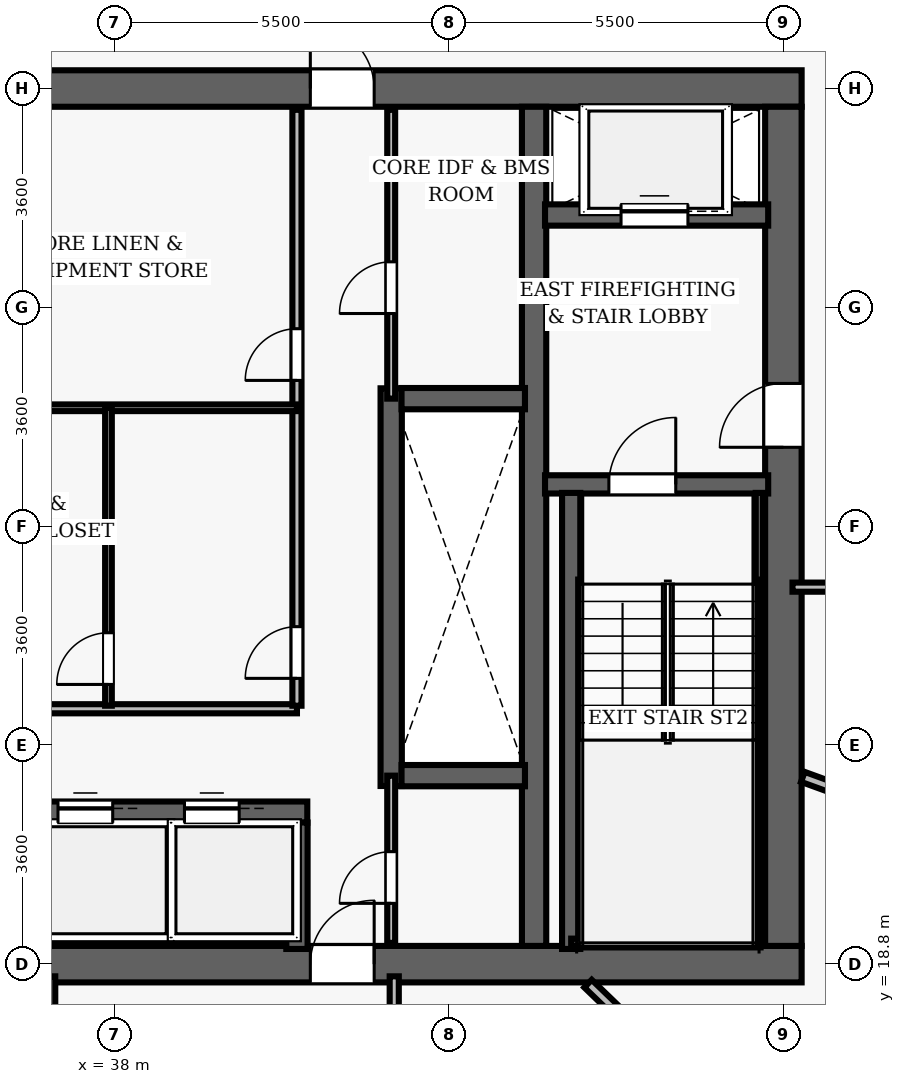
"""IFC4 building model, lengths in metres.
Left out: names, types, materials, properties, quantities, classifications, styles, units other than length and angle.
Written with IfcOpenShell. Run it as: python <this file> out.ifc"""

import sys

from ifc_helpers import new_model, si_unit, direction, frame, frame_2d, origin, place, context, subcontext, project, spatial, rectangle, extrude, element, fill, save


model = new_model("IFC4")
c1 = context("Model", 3, precision=1e-05, world=origin(), true_north=direction((0.0, 1.0)))
c2 = subcontext(c1, "Body", "Model", "MODEL_VIEW")
j1 = project(units=[si_unit("LENGTHUNIT", "METRE"), si_unit("PLANEANGLEUNIT", "RADIAN")], contexts=[c1])
p1 = place(None, origin())
s1 = spatial("IfcSite", under=j1, at=p1, CompositionType="ELEMENT")
p2 = place(p1, origin())
s2 = spatial("IfcBuilding", under=s1, at=p2, CompositionType="ELEMENT")
p3 = place(p2, frame((0.0, 0.0, 148.3)))
s3 = spatial("IfcBuildingStorey", under=s2, at=p3, CompositionType="ELEMENT", Elevation=148.3)
p4 = place(p3, frame((26.7, 18.8, 0.0), z_axis=(0.0, 0.0, 1.0), x_axis=(1.0, 0.0, 0.0)))
e1 = element("IfcWall", 1, at=p4, inside=s3, PredefinedType="SHEAR", context=c2, shape_type="SweptSolid", body=[
    extrude(rectangle(XDim=22.6, YDim=0.6, at=frame_2d((11.3, 0.0))), origin(), (0.0, 0.0, 1.0), 3.5),
])
p5 = place(p4, frame((14.52, 0.0, 0.0)))
e2 = element("IfcOpeningElement", 2, at=p5, cuts=e1, PredefinedType="OPENING", context=c2, shape_type="SweptSolid", body=[
    extrude(rectangle(XDim=1.05, YDim=2.15, at=frame_2d((0.525, 1.075))), frame((0.0, 0.31, 0.0), z_axis=(0.0, -1.0, 0.0), x_axis=(1.0, 0.0, 0.0)), (0.0, 0.0, 1.0), 0.62),
])
p6 = place(p3, frame((26.7, 33.2, 0.0), z_axis=(0.0, 0.0, 1.0), x_axis=(1.0, 0.0, 0.0)))
e3 = element("IfcWall", 3, at=p6, inside=s3, PredefinedType="SHEAR", context=c2, shape_type="SweptSolid", body=[
    extrude(rectangle(XDim=22.6, YDim=0.6, at=frame_2d((11.3, 0.0))), origin(), (0.0, 0.0, 1.0), 3.5),
])
p7 = place(p6, frame((4.62, 0.0, 0.0)))
e4 = element("IfcOpeningElement", 4, at=p7, cuts=e3, PredefinedType="OPENING", context=c2, shape_type="SweptSolid", body=[
    extrude(rectangle(XDim=1.05, YDim=2.15, at=frame_2d((0.525, 1.075))), frame((0.0, 0.31, 0.0), z_axis=(0.0, -1.0, 0.0), x_axis=(1.0, 0.0, 0.0)), (0.0, 0.0, 1.0), 0.62),
])
p8 = place(p6, frame((14.52, 0.0, 0.0)))
e5 = element("IfcOpeningElement", 5, at=p8, cuts=e3, PredefinedType="OPENING", context=c2, shape_type="SweptSolid", body=[
    extrude(rectangle(XDim=1.05, YDim=2.15, at=frame_2d((0.525, 1.075))), frame((0.0, 0.31, 0.0), z_axis=(0.0, -1.0, 0.0), x_axis=(1.0, 0.0, 0.0)), (0.0, 0.0, 1.0), 0.62),
])
p9 = place(p3, frame((49.0, 19.1, 0.0), z_axis=(0.0, 0.0, 1.0), x_axis=(0.0, 1.0, 0.0)))
e6 = element("IfcWall", 6, at=p9, inside=s3, PredefinedType="SHEAR", context=c2, shape_type="SweptSolid", body=[
    extrude(rectangle(XDim=13.8, YDim=0.6, at=frame_2d((6.9, 0.0))), origin(), (0.0, 0.0, 1.0), 3.5),
])
p10 = place(p9, frame((8.2, 0.0, 0.0)))
e7 = element("IfcOpeningElement", 7, at=p10, cuts=e6, PredefinedType="OPENING", context=c2, shape_type="SweptSolid", body=[
    extrude(rectangle(XDim=1.05, YDim=2.15, at=frame_2d((0.525, 1.075))), frame((0.0, 0.31, 0.0), z_axis=(0.0, -1.0, 0.0), x_axis=(1.0, 0.0, 0.0)), (0.0, 0.0, 1.0), 0.62),
])
p11 = place(p3, frame((44.9, 19.1, 0.0), z_axis=(0.0, 0.0, 1.0), x_axis=(0.0, 1.0, 0.0)))
e8 = element("IfcWall", 8, at=p11, inside=s3, PredefinedType="SHEAR", context=c2, shape_type="SweptSolid", body=[
    extrude(rectangle(XDim=13.8, YDim=0.4, at=frame_2d((6.9, 0.0))), origin(), (0.0, 0.0, 1.0), 3.5),
])
p12 = place(p3, frame((45.08, 26.69, 0.0), z_axis=(0.0, 0.0, 1.0), x_axis=(1.0, 0.0, 0.0)))
e9 = element("IfcWall", 9, at=p12, inside=s3, PredefinedType="SHEAR", context=c2, shape_type="SweptSolid", body=[
    extrude(rectangle(XDim=3.67, YDim=0.3, at=frame_2d((1.835, 0.0))), origin(), (0.0, 0.0, 1.0), 3.5),
])
p13 = place(p12, frame((1.05, 0.0, 0.0)))
e10 = element("IfcOpeningElement", 10, at=p13, cuts=e9, PredefinedType="OPENING", context=c2, shape_type="SweptSolid", body=[
    extrude(rectangle(XDim=1.1, YDim=2.15, at=frame_2d((0.55, 1.075))), frame((0.0, 0.16, 0.0), z_axis=(0.0, -1.0, 0.0), x_axis=(1.0, 0.0, 0.0)), (0.0, 0.0, 1.0), 0.32),
])
p14 = place(p3, frame((45.51, 19.05, 0.0), z_axis=(0.0, 0.0, 1.0), x_axis=(0.0, 1.0, 0.0)))
e11 = element("IfcWall", 11, at=p14, inside=s3, PredefinedType="SHEAR", context=c2, shape_type="SweptSolid", body=[
    extrude(rectangle(XDim=7.5, YDim=0.3, at=frame_2d((3.75, 0.0))), origin(), (0.0, 0.0, 1.0), 3.5),
])
p15 = place(p3, frame((48.605, 19.1, 0.0), z_axis=(0.0, 0.0, 1.0), x_axis=(0.0, 1.0, 0.0)))
e12 = element("IfcWall", 12, at=p15, inside=s3, PredefinedType="SHEAR", context=c2, shape_type="SweptSolid", body=[
    extrude(rectangle(XDim=7.45, YDim=0.12, at=frame_2d((3.725, 0.0))), origin(), (0.0, 0.0, 1.0), 3.5),
])
p16 = place(p3, frame((45.51, 19.16, 0.0), z_axis=(0.0, 0.0, 1.0), x_axis=(1.0, 0.0, 0.0)))
e13 = element("IfcWall", 13, at=p16, inside=s3, PredefinedType="SHEAR", context=c2, shape_type="SweptSolid", body=[
    extrude(rectangle(XDim=3.095, YDim=0.12, at=frame_2d((1.547, 0.0))), origin(), (0.0, 0.0, 1.0), 3.5),
])
p17 = place(p3, frame((45.08, 31.12, 0.0), z_axis=(0.0, 0.0, 1.0), x_axis=(1.0, 0.0, 0.0)))
e14 = element("IfcWall", 14, at=p17, inside=s3, PredefinedType="SHEAR", context=c2, shape_type="SweptSolid", body=[
    extrude(rectangle(XDim=3.67, YDim=0.35, at=frame_2d((1.835, 0.0))), origin(), (0.0, 0.0, 1.0), 2.675),
])
p18 = place(p17, frame((1.25, 0.0, 0.0)))
e15 = element("IfcOpeningElement", 15, at=p18, cuts=e14, PredefinedType="OPENING", context=c2, shape_type="SweptSolid", body=[
    extrude(rectangle(XDim=1.1, YDim=2.15, at=frame_2d((0.55, 1.075))), frame((0.0, 0.185, 0.0), z_axis=(0.0, -1.0, 0.0), x_axis=(1.0, 0.0, 0.0)), (0.0, 0.0, 1.0), 0.37),
])
p19 = place(p3, frame((42.55, 21.73, 0.0), z_axis=(0.0, 0.0, 1.0), x_axis=(0.0, 1.0, 0.0)))
e16 = element("IfcWall", 16, at=p19, inside=s3, PredefinedType="SHEAR", context=c2, shape_type="SweptSolid", body=[
    extrude(rectangle(XDim=6.54, YDim=0.35, at=frame_2d((3.27, 0.0))), origin(), (0.0, 0.0, 1.0), 2.675),
])
for number, where, z_axis, x_axis in (
    (17, (42.72, 21.9, 0.0), (0.0, 0.0, 1.0), (1.0, 0.0, 0.0)),
    (18, (42.72, 28.1, 0.0), (0.0, 0.0, 1.0), (1.0, 0.0, 0.0)),
):
    element("IfcWall", number, at=place(p3, frame(where, z_axis=z_axis, x_axis=x_axis)), inside=s3, PredefinedType="SHEAR", context=c2, shape_type="SweptSolid", body=[
        extrude(rectangle(XDim=2.03, YDim=0.35, at=frame_2d((1.015, 0.0))), origin(), (0.0, 0.0, 1.0), 2.675),
    ])
p20 = place(p3, frame((34.49, 21.3, 0.0), z_axis=(0.0, 0.0, 1.0), x_axis=(1.0, 0.0, 0.0)))
e19 = element("IfcWall", 19, at=p20, inside=s3, PredefinedType="SHEAR", context=c2, shape_type="SweptSolid", body=[
    extrude(rectangle(XDim=6.68, YDim=0.35, at=frame_2d((3.34, 0.0))), origin(), (0.0, 0.0, 1.0), 2.675),
])
p21 = place(p20, frame((0.5, 0.0, 0.0)))
e20 = element("IfcOpeningElement", 20, at=p21, cuts=e19, PredefinedType="OPENING", context=c2, shape_type="SweptSolid", body=[
    extrude(rectangle(XDim=0.9, YDim=2.15, at=frame_2d((0.45, 1.075))), frame((0.0, 0.185, 0.0), z_axis=(0.0, -1.0, 0.0), x_axis=(1.0, 0.0, 0.0)), (0.0, 0.0, 1.0), 0.37),
])
p22 = place(p20, frame((2.58, 0.0, 0.0)))
e21 = element("IfcOpeningElement", 21, at=p22, cuts=e19, PredefinedType="OPENING", context=c2, shape_type="SweptSolid", body=[
    extrude(rectangle(XDim=0.9, YDim=2.15, at=frame_2d((0.45, 1.075))), frame((0.0, 0.185, 0.0), z_axis=(0.0, -1.0, 0.0), x_axis=(1.0, 0.0, 0.0)), (0.0, 0.0, 1.0), 0.37),
])
p23 = place(p20, frame((4.66, 0.0, 0.0)))
e22 = element("IfcOpeningElement", 22, at=p23, cuts=e19, PredefinedType="OPENING", context=c2, shape_type="SweptSolid", body=[
    extrude(rectangle(XDim=0.9, YDim=2.15, at=frame_2d((0.45, 1.075))), frame((0.0, 0.185, 0.0), z_axis=(0.0, -1.0, 0.0), x_axis=(1.0, 0.0, 0.0)), (0.0, 0.0, 1.0), 0.37),
])
p24 = place(p3, frame((41.0, 19.05, 0.0), z_axis=(0.0, 0.0, 1.0), x_axis=(0.0, 1.0, 0.0)))
e23 = element("IfcWall", 23, at=p24, inside=s3, PredefinedType="SHEAR", context=c2, shape_type="SweptSolid", body=[
    extrude(rectangle(XDim=2.08, YDim=0.35, at=frame_2d((1.04, 0.0))), origin(), (0.0, 0.0, 1.0), 2.675),
])
p25 = place(p3, frame((34.75, 23.0, 0.0), z_axis=(0.0, 0.0, 1.0), x_axis=(1.0, 0.0, 0.0)))
e24 = element("IfcWall", 24, at=p25, inside=s3, PredefinedType="PARTITIONING", context=c2, shape_type="SweptSolid", body=[
    extrude(rectangle(XDim=6.25, YDim=0.15, at=frame_2d((3.125, 0.0))), origin(), (0.0, 0.0, 1.0), 2.675),
])
p26 = place(p3, frame((41.0, 23.05, 0.0), z_axis=(0.0, 0.0, 1.0), x_axis=(0.0, 1.0, 0.0)))
e25 = element("IfcWall", 25, at=p26, inside=s3, PredefinedType="PARTITIONING", context=c2, shape_type="SweptSolid", body=[
    extrude(rectangle(XDim=9.8, YDim=0.15, at=frame_2d((4.9, 0.0))), origin(), (0.0, 0.0, 1.0), 2.675),
])
p27 = place(p26, frame((5.35, 0.0, 0.0)))
e26 = element("IfcOpeningElement", 26, at=p27, cuts=e25, PredefinedType="OPENING", context=c2, shape_type="SweptSolid", body=[
    extrude(rectangle(XDim=0.85, YDim=2.1, at=frame_2d((0.425, 1.05))), frame((0.0, 0.085, 0.0), z_axis=(0.0, -1.0, 0.0), x_axis=(1.0, 0.0, 0.0)), (0.0, 0.0, 1.0), 0.17),
])
p28 = place(p26, frame((0.45, 0.0, 0.0)))
e27 = element("IfcOpeningElement", 27, at=p28, cuts=e25, PredefinedType="OPENING", context=c2, shape_type="SweptSolid", body=[
    extrude(rectangle(XDim=0.85, YDim=2.1, at=frame_2d((0.425, 1.05))), frame((0.0, 0.085, 0.0), z_axis=(0.0, -1.0, 0.0), x_axis=(1.0, 0.0, 0.0)), (0.0, 0.0, 1.0), 0.17),
])
p29 = place(p3, frame((34.75, 27.95, 0.0), z_axis=(0.0, 0.0, 1.0), x_axis=(1.0, 0.0, 0.0)))
e28 = element("IfcWall", 28, at=p29, inside=s3, PredefinedType="PARTITIONING", context=c2, shape_type="SweptSolid", body=[
    extrude(rectangle(XDim=6.25, YDim=0.11, at=frame_2d((3.125, 0.0))), origin(), (0.0, 0.0, 1.0), 2.675),
])
p30 = place(p3, frame((37.9, 23.05, 0.0), z_axis=(0.0, 0.0, 1.0), x_axis=(0.0, 1.0, 0.0)))
e29 = element("IfcWall", 29, at=p30, inside=s3, PredefinedType="PARTITIONING", context=c2, shape_type="SweptSolid", body=[
    extrude(rectangle(XDim=4.9, YDim=0.11, at=frame_2d((2.45, 0.0))), origin(), (0.0, 0.0, 1.0), 2.675),
])
p31 = place(p30, frame((0.35, 0.0, 0.0)))
e30 = element("IfcOpeningElement", 30, at=p31, cuts=e29, PredefinedType="OPENING", context=c2, shape_type="SweptSolid", body=[
    extrude(rectangle(XDim=0.85, YDim=2.1, at=frame_2d((0.425, 1.05))), frame((0.0, 0.065, 0.0), z_axis=(0.0, -1.0, 0.0), x_axis=(1.0, 0.0, 0.0)), (0.0, 0.0, 1.0), 0.13),
])
p32 = place(p3, frame((42.55, 28.1, 0.0), z_axis=(0.0, 0.0, 1.0), x_axis=(0.0, 1.0, 0.0)))
e31 = element("IfcWall", 31, at=p32, inside=s3, PredefinedType="PARTITIONING", context=c2, shape_type="SweptSolid", body=[
    extrude(rectangle(XDim=4.75, YDim=0.13, at=frame_2d((2.375, 0.0))), origin(), (0.0, 0.0, 1.0), 2.675),
])
p33 = place(p32, frame((1.4, 0.0, 0.0)))
e32 = element("IfcOpeningElement", 32, at=p33, cuts=e31, PredefinedType="OPENING", context=c2, shape_type="SweptSolid", body=[
    extrude(rectangle(XDim=0.85, YDim=2.1, at=frame_2d((0.425, 1.05))), frame((0.0, 0.075, 0.0), z_axis=(0.0, -1.0, 0.0), x_axis=(1.0, 0.0, 0.0)), (0.0, 0.0, 1.0), 0.15),
])
p34 = place(p3, frame((42.55, 19.15, 0.0), z_axis=(0.0, 0.0, 1.0), x_axis=(0.0, 1.0, 0.0)))
e33 = element("IfcWall", 33, at=p34, inside=s3, PredefinedType="PARTITIONING", context=c2, shape_type="SweptSolid", body=[
    extrude(rectangle(XDim=2.75, YDim=0.13, at=frame_2d((1.375, 0.0))), origin(), (0.0, 0.0, 1.0), 2.675),
])
p35 = place(p34, frame((0.65, 0.0, 0.0)))
e34 = element("IfcOpeningElement", 34, at=p35, cuts=e33, PredefinedType="OPENING", context=c2, shape_type="SweptSolid", body=[
    extrude(rectangle(XDim=0.85, YDim=2.1, at=frame_2d((0.425, 1.05))), frame((0.0, 0.075, 0.0), z_axis=(0.0, -1.0, 0.0), x_axis=(1.0, 0.0, 0.0)), (0.0, 0.0, 1.0), 0.15),
])
p36 = place(p3, frame((49.15, 25.0, 0.0), z_axis=(0.0, 0.0, 1.0), x_axis=(1.0, 0.0, 0.0)))
e35 = element("IfcWall", 35, at=p36, inside=s3, PredefinedType="PARTITIONING", context=c2, shape_type="SweptSolid", body=[
    extrude(rectangle(XDim=12.091, YDim=0.15, at=frame_2d((6.045, 0.0))), origin(), (0.0, 0.0, 1.0), 2.675),
])
p37 = place(p36, frame((2.548, 0.0, 0.0)))
e36 = element("IfcOpeningElement", 36, at=p37, cuts=e35, PredefinedType="OPENING", context=c2, shape_type="SweptSolid", body=[
    extrude(rectangle(XDim=0.95, YDim=2.15, at=frame_2d((0.475, 1.075))), frame((0.0, 0.085, 0.0), z_axis=(0.0, -1.0, 0.0), x_axis=(1.0, 0.0, 0.0)), (0.0, 0.0, 1.0), 0.17),
])
p38 = place(p3, frame((36.95, 11.2, 0.0), z_axis=(0.0, 0.0, 1.0), x_axis=(0.0, 1.0, 0.0)))
e37 = element("IfcWall", 37, at=p38, inside=s3, PredefinedType="PARTITIONING", context=c2, shape_type="SweptSolid", body=[
    extrude(rectangle(XDim=7.4, YDim=0.15, at=frame_2d((3.7, 0.0))), origin(), (0.0, 0.0, 1.0), 2.675),
])
p39 = place(p38, frame((5.075, 0.0, 0.0)))
e38 = element("IfcOpeningElement", 38, at=p39, cuts=e37, PredefinedType="OPENING", context=c2, shape_type="SweptSolid", body=[
    extrude(rectangle(XDim=0.95, YDim=2.15, at=frame_2d((0.475, 1.075))), frame((0.0, 0.085, 0.0), z_axis=(0.0, -1.0, 0.0), x_axis=(1.0, 0.0, 0.0)), (0.0, 0.0, 1.0), 0.17),
])
p40 = place(p3, frame((42.6, 16.65, 0.0), z_axis=(0.0, 0.0, 1.0), x_axis=(0.0, 1.0, 0.0)))
e39 = element("IfcWall", 39, at=p40, inside=s3, PredefinedType="PARTITIONING", context=c2, shape_type="SweptSolid", body=[
    extrude(rectangle(XDim=1.95, YDim=0.15, at=frame_2d((0.975, 0.0))), origin(), (0.0, 0.0, 1.0), 2.675),
])
p41 = place(p3, frame((45.787, 18.48, 0.0), z_axis=(0.0, 0.0, 1.0), x_axis=(0.719347752113, -0.694650136062, 0.0)))
e40 = element("IfcWall", 40, at=p41, inside=s3, PredefinedType="PARTITIONING", context=c2, shape_type="SweptSolid", body=[
    extrude(rectangle(XDim=16.449, YDim=0.175, at=frame_2d((8.225, 0.0))), origin(), (0.0, 0.0, 1.0), 2.675),
])
p42 = place(p3, frame((49.32, 21.88, 0.0), z_axis=(0.0, 0.0, 1.0), x_axis=(0.939671379792, -0.34207849684, 0.0)))
e41 = element("IfcWall", 41, at=p42, inside=s3, PredefinedType="PARTITIONING", context=c2, shape_type="SweptSolid", body=[
    extrude(rectangle(XDim=3.331, YDim=0.175, at=frame_2d((1.666, 0.0))), origin(), (0.0, 0.0, 1.0), 2.675),
])
p43 = place(p13, origin())
e42 = element("IfcDoor", 42, at=p43, inside=s3, OperationType="SINGLE_SWING_RIGHT", PredefinedType="DOOR", context=c2, shape_type="SweptSolid", body=[
    extrude(rectangle(XDim=1.1, YDim=2.15, at=frame_2d((0.55, 1.075))), frame((0.0, 0.025, 0.0), z_axis=(0.0, -1.0, 0.0), x_axis=(1.0, 0.0, 0.0)), (0.0, 0.0, 1.0), 0.05),
])
fill(e10, e42)
p44 = place(p10, origin())
e43 = element("IfcDoor", 43, at=p44, inside=s3, OperationType="SINGLE_SWING_LEFT", PredefinedType="DOOR", context=c2, shape_type="SweptSolid", body=[
    extrude(rectangle(XDim=1.05, YDim=2.15, at=frame_2d((0.525, 1.075))), frame((0.0, 0.025, 0.0), z_axis=(0.0, -1.0, 0.0), x_axis=(1.0, 0.0, 0.0)), (0.0, 0.0, 1.0), 0.05),
])
fill(e7, e43)
p45 = place(p8, origin())
e44 = element("IfcDoor", 44, at=p45, inside=s3, OperationType="SINGLE_SWING_LEFT", PredefinedType="DOOR", context=c2, shape_type="SweptSolid", body=[
    extrude(rectangle(XDim=1.05, YDim=2.15, at=frame_2d((0.525, 1.075))), frame((0.0, 0.025, 0.0), z_axis=(0.0, -1.0, 0.0), x_axis=(1.0, 0.0, 0.0)), (0.0, 0.0, 1.0), 0.05),
])
fill(e5, e44)
p46 = place(p5, origin())
e45 = element("IfcDoor", 45, at=p46, inside=s3, OperationType="SINGLE_SWING_RIGHT", PredefinedType="DOOR", context=c2, shape_type="SweptSolid", body=[
    extrude(rectangle(XDim=1.05, YDim=2.15, at=frame_2d((0.525, 1.075))), frame((0.0, 0.025, 0.0), z_axis=(0.0, -1.0, 0.0), x_axis=(1.0, 0.0, 0.0)), (0.0, 0.0, 1.0), 0.05),
])
fill(e2, e45)
p47 = place(p27, origin())
e46 = element("IfcDoor", 46, at=p47, inside=s3, OperationType="SINGLE_SWING_LEFT", PredefinedType="DOOR", context=c2, shape_type="SweptSolid", body=[
    extrude(rectangle(XDim=0.85, YDim=2.1, at=frame_2d((0.425, 1.05))), frame((0.0, 0.025, 0.0), z_axis=(0.0, -1.0, 0.0), x_axis=(1.0, 0.0, 0.0)), (0.0, 0.0, 1.0), 0.05),
])
fill(e26, e46)
p48 = place(p28, origin())
e47 = element("IfcDoor", 47, at=p48, inside=s3, OperationType="SINGLE_SWING_LEFT", PredefinedType="DOOR", context=c2, shape_type="SweptSolid", body=[
    extrude(rectangle(XDim=0.85, YDim=2.1, at=frame_2d((0.425, 1.05))), frame((0.0, 0.025, 0.0), z_axis=(0.0, -1.0, 0.0), x_axis=(1.0, 0.0, 0.0)), (0.0, 0.0, 1.0), 0.05),
])
fill(e27, e47)
p49 = place(p31, origin())
e48 = element("IfcDoor", 48, at=p49, inside=s3, OperationType="SINGLE_SWING_LEFT", PredefinedType="DOOR", context=c2, shape_type="SweptSolid", body=[
    extrude(rectangle(XDim=0.85, YDim=2.1, at=frame_2d((0.425, 1.05))), frame((0.0, 0.025, 0.0), z_axis=(0.0, -1.0, 0.0), x_axis=(1.0, 0.0, 0.0)), (0.0, 0.0, 1.0), 0.05),
])
fill(e30, e48)
p50 = place(p33, origin())
e49 = element("IfcDoor", 49, at=p50, inside=s3, OperationType="SINGLE_SWING_LEFT", PredefinedType="DOOR", context=c2, shape_type="SweptSolid", body=[
    extrude(rectangle(XDim=0.85, YDim=2.1, at=frame_2d((0.425, 1.05))), frame((0.0, 0.025, 0.0), z_axis=(0.0, -1.0, 0.0), x_axis=(1.0, 0.0, 0.0)), (0.0, 0.0, 1.0), 0.05),
])
fill(e32, e49)
p51 = place(p35, origin())
e50 = element("IfcDoor", 50, at=p51, inside=s3, OperationType="SINGLE_SWING_LEFT", PredefinedType="DOOR", context=c2, shape_type="SweptSolid", body=[
    extrude(rectangle(XDim=0.85, YDim=2.1, at=frame_2d((0.425, 1.05))), frame((0.0, 0.025, 0.0), z_axis=(0.0, -1.0, 0.0), x_axis=(1.0, 0.0, 0.0)), (0.0, 0.0, 1.0), 0.05),
])
fill(e34, e50)
p52 = place(p22, origin())
e51 = element("IfcDoor", 51, at=p52, inside=s3, OperationType="SLIDING_TO_LEFT", PredefinedType="DOOR", context=c2, shape_type="SweptSolid", body=[
    extrude(rectangle(XDim=0.9, YDim=2.15, at=frame_2d((0.45, 1.075))), frame((0.0, 0.025, 0.0), z_axis=(0.0, -1.0, 0.0), x_axis=(1.0, 0.0, 0.0)), (0.0, 0.0, 1.0), 0.05),
])
fill(e21, e51)
p53 = place(p23, origin())
e52 = element("IfcDoor", 52, at=p53, inside=s3, OperationType="SLIDING_TO_LEFT", PredefinedType="DOOR", context=c2, shape_type="SweptSolid", body=[
    extrude(rectangle(XDim=0.9, YDim=2.15, at=frame_2d((0.45, 1.075))), frame((0.0, 0.025, 0.0), z_axis=(0.0, -1.0, 0.0), x_axis=(1.0, 0.0, 0.0)), (0.0, 0.0, 1.0), 0.05),
])
fill(e22, e52)
p54 = place(p18, origin())
e53 = element("IfcDoor", 53, at=p54, inside=s3, OperationType="SLIDING_TO_LEFT", PredefinedType="DOOR", context=c2, shape_type="SweptSolid", body=[
    extrude(rectangle(XDim=1.1, YDim=2.15, at=frame_2d((0.55, 1.075))), frame((0.0, 0.025, 0.0), z_axis=(0.0, -1.0, 0.0), x_axis=(1.0, 0.0, 0.0)), (0.0, 0.0, 1.0), 0.05),
])
fill(e15, e53)
save(model, sys.argv[1])
